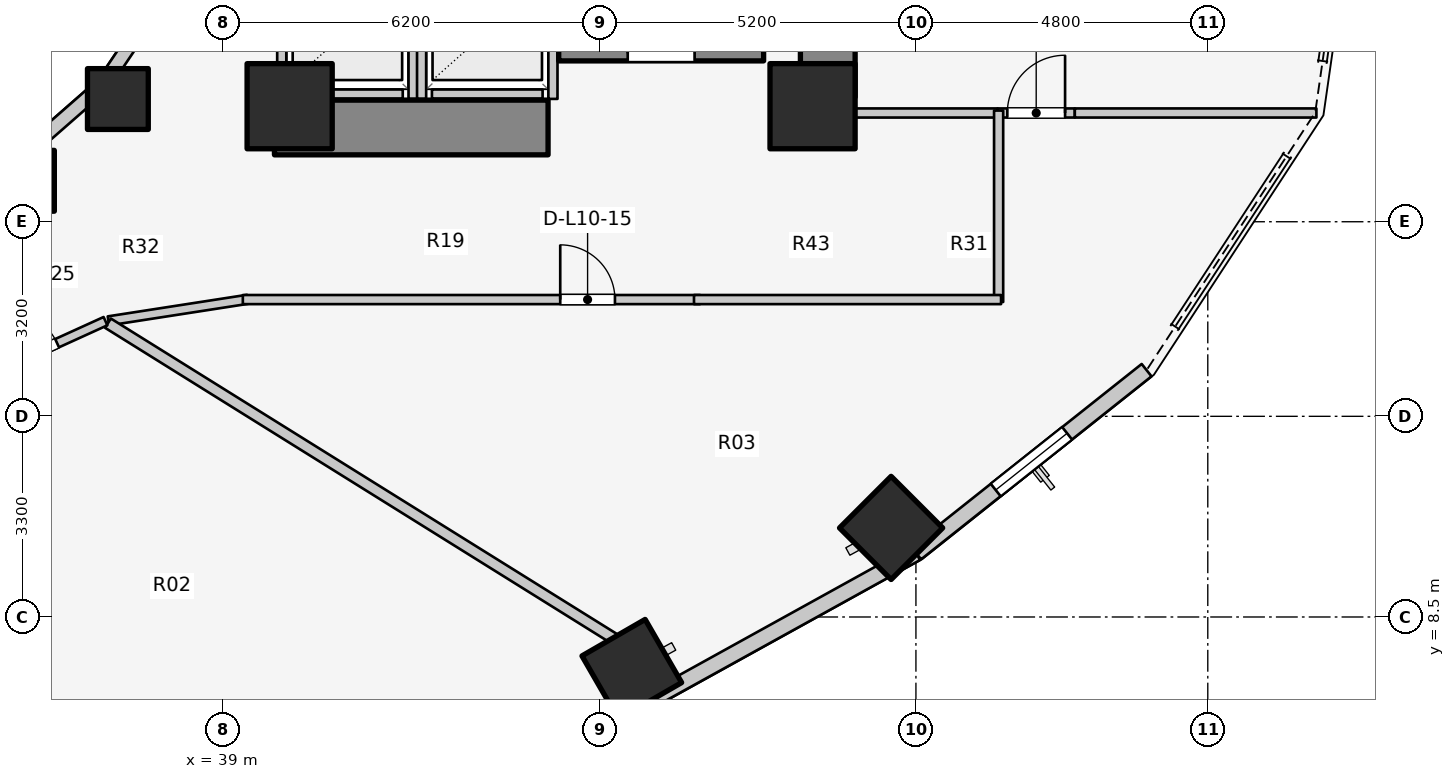
"""IFC4 building model, lengths in metres.
Left out: names, types, materials, properties, quantities, classifications, styles, units other than length and angle.
Written with IfcOpenShell. Run it as: python <this file> out.ifc"""

import sys

from ifc_helpers import new_model, si_unit, direction, frame, frame_2d, origin, origin_2d, place, context, subcontext, project, spatial, rectangle, extrude, element, fill, save


model = new_model("IFC4")
c1 = context("Model", 3, precision=1e-05, world=origin(), true_north=direction((0.0, 1.0)))
c2 = subcontext(c1, "Body", "Model", "MODEL_VIEW")
j1 = project(units=[si_unit("LENGTHUNIT", "METRE"), si_unit("PLANEANGLEUNIT", "RADIAN")], contexts=[c1])
p1 = place(None, origin())
s1 = spatial("IfcSite", under=j1, at=p1, CompositionType="ELEMENT")
p2 = place(p1, origin())
s2 = spatial("IfcBuilding", under=s1, at=p2, CompositionType="ELEMENT")
p3 = place(p2, frame((0.0, 0.0, 36.9)))
s3 = spatial("IfcBuildingStorey", under=s2, at=p3, CompositionType="ELEMENT", Elevation=36.9)
p4 = place(p3, frame((48.95, 17.05, 0.0), z_axis=(0.0, 0.0, 1.0), x_axis=(0.0, 1.0, 0.0)))
e1 = element("IfcWall", 1, at=p4, inside=s3, PredefinedType="SHEAR", context=c2, shape_type="SweptSolid", body=[
    extrude(rectangle(XDim=12.8, YDim=0.9, at=frame_2d((6.4, 0.0))), origin(), (0.0, 0.0, 1.0), 3.1),
])
p5 = place(p3, frame((39.85, 16.55, 0.0), z_axis=(0.0, 0.0, 1.0), x_axis=(1.0, 0.0, 0.0)))
e2 = element("IfcWall", 2, at=p5, inside=s3, PredefinedType="SHEAR", context=c2, shape_type="SweptSolid", body=[
    extrude(rectangle(XDim=4.5, YDim=0.9, at=frame_2d((2.25, 0.0))), origin(), (0.0, 0.0, 1.0), 3.1),
])
p6 = place(p3, frame((44.525, 17.77, 0.0), z_axis=(0.0, 0.0, 1.0), x_axis=(1.0, 0.0, 0.0)))
e3 = element("IfcWall", 3, at=p6, inside=s3, PredefinedType="SOLIDWALL", context=c2, shape_type="SweptSolid", body=[
    extrude(rectangle(XDim=3.37, YDim=0.25, at=frame_2d((1.685, 0.0))), origin(), (0.0, 0.0, 1.0), 3.1),
])
p7 = place(p6, frame((1.135, 0.0, 0.0)))
e4 = element("IfcOpeningElement", 4, at=p7, cuts=e3, PredefinedType="OPENING", context=c2, shape_type="SweptSolid", body=[
    extrude(rectangle(XDim=1.1, YDim=2.1, at=frame_2d((0.55, 1.05))), frame((0.0, 0.135, 0.0), z_axis=(0.0, -1.0, 0.0), x_axis=(1.0, 0.0, 0.0)), (0.0, 0.0, 1.0), 0.27),
])
for number, where, z_axis, x_axis in (
    (5, (40.1, 16.9, 0.0), (0.0, 0.0, 1.0), (1.0, 0.0, 0.0)),
    (6, (48.7, 16.9, 0.0), (0.0, 0.0, 1.0), (1.0, 0.0, 0.0)),
):
    element("IfcColumn", number, at=place(p3, frame(where, z_axis=z_axis, x_axis=x_axis)), inside=s3, PredefinedType="COLUMN", context=c2, shape_type="SweptSolid", body=[
        extrude(rectangle(XDim=1.4, YDim=1.4, at=origin_2d()), origin(), (0.0, 0.0, 1.0), 3.1),
    ])
p8 = place(p3, frame((35.73, 15.673, 0.0), z_axis=(0.0, 0.0, 1.0), x_axis=(1.0, 0.0, 0.0)))
e7 = element("IfcColumn", 7, at=p8, inside=s3, PredefinedType="COLUMN", context=c2, shape_type="SweptSolid", body=[
    extrude(rectangle(XDim=1.0, YDim=1.0, at=origin_2d()), origin(), (0.0, 0.0, 1.0), 3.1),
])
p9 = place(p3, frame((45.727, 7.641, 0.0), z_axis=(0.0, 0.0, 1.0), x_axis=(0.5, -0.866025403784, 0.0)))
e8 = element("IfcColumn", 8, at=p9, inside=s3, PredefinedType="COLUMN", context=c2, shape_type="SweptSolid", body=[
    extrude(rectangle(XDim=1.2, YDim=1.2, at=origin_2d()), origin(), (0.0, 0.0, 1.0), 3.1),
])
p10 = place(p3, frame((37.275, 17.018, 0.0), z_axis=(0.0, 0.0, 1.0), x_axis=(1.0, 0.0, 0.0)))
e9 = element("IfcColumn", 9, at=p10, inside=s3, PredefinedType="COLUMN", context=c2, shape_type="SweptSolid", body=[
    extrude(rectangle(XDim=1.0, YDim=1.0, at=origin_2d()), origin(), (0.0, 0.0, 1.0), 3.1),
])
p11 = place(p3, frame((49.992, 9.965, 0.0), z_axis=(0.0, 0.0, 1.0), x_axis=(0.707106781187, -0.707106781187, 0.0)))
e10 = element("IfcColumn", 10, at=p11, inside=s3, PredefinedType="COLUMN", context=c2, shape_type="SweptSolid", body=[
    extrude(rectangle(XDim=1.2, YDim=1.2, at=origin_2d()), origin(), (0.0, 0.0, 1.0), 3.1),
])
p12 = place(p3, frame((35.56, 15.968, 0.0), z_axis=(0.0, 0.0, 1.0), x_axis=(0.752576694707, 0.658504607869, 0.0)))
e11 = element("IfcWall", 11, at=p12, inside=s3, PredefinedType="STANDARD", context=c2, shape_type="SweptSolid", body=[
    extrude(rectangle(XDim=1.959, YDim=0.23, at=frame_2d((0.98, 0.0))), origin(), (0.0, 0.0, 1.0), 2.16),
])
p13 = place(p3, frame((37.035, 17.258, 0.0), z_axis=(0.0, 0.0, 1.0), x_axis=(0.558197800898, 0.829707909492, 0.0)))
e12 = element("IfcWall", 12, at=p13, inside=s3, PredefinedType="STANDARD", context=c2, shape_type="SweptSolid", body=[
    extrude(rectangle(XDim=2.027, YDim=0.23, at=frame_2d((1.013, 0.0))), origin(), (0.0, 0.0, 1.0), 2.16),
])
p14 = place(p3, frame((40.332, 5.447, 0.0), z_axis=(0.0, 0.0, 1.0), x_axis=(0.958843593522, 0.283934786811, 0.0)))
e13 = element("IfcWall", 13, at=p14, inside=s3, PredefinedType="STANDARD", context=c2, shape_type="SweptSolid", body=[
    extrude(rectangle(XDim=5.955, YDim=0.26, at=frame_2d((2.978, 0.0))), origin(), (0.0, 0.0, 1.0), 2.85),
])
p15 = place(p14, frame((2.228, 0.0, 0.75)))
e14 = element("IfcOpeningElement", 14, at=p15, cuts=e13, PredefinedType="OPENING", context=c2, shape_type="SweptSolid", body=[
    extrude(rectangle(XDim=1.5, YDim=1.6, at=frame_2d((0.75, 0.8))), frame((0.0, 0.14, 0.0), z_axis=(0.0, -1.0, 0.0), x_axis=(1.0, 0.0, 0.0)), (0.0, 0.0, 1.0), 0.28),
])
p16 = place(p3, frame((46.042, 7.138, 0.0), z_axis=(0.0, 0.0, 1.0), x_axis=(0.875137303239, 0.483874674352, 0.0)))
e15 = element("IfcWall", 15, at=p16, inside=s3, PredefinedType="STANDARD", context=c2, shape_type="SweptSolid", body=[
    extrude(rectangle(XDim=4.985, YDim=0.26, at=frame_2d((2.493, 0.0))), origin(), (0.0, 0.0, 1.0), 2.85),
])
p17 = place(p3, frame((50.405, 9.55, 0.0), z_axis=(0.0, 0.0, 1.0), x_axis=(0.783123133379, 0.621866672179, 0.0)))
e16 = element("IfcWall", 16, at=p17, inside=s3, PredefinedType="STANDARD", context=c2, shape_type="SweptSolid", body=[
    extrude(rectangle(XDim=4.839, YDim=0.26, at=frame_2d((2.419, 0.0))), origin(), (0.0, 0.0, 1.0), 2.85),
])
p18 = place(p17, frame((1.669, 0.0, 0.75)))
e17 = element("IfcOpeningElement", 17, at=p18, cuts=e16, PredefinedType="OPENING", context=c2, shape_type="SweptSolid", body=[
    extrude(rectangle(XDim=1.5, YDim=1.6, at=frame_2d((0.75, 0.8))), frame((0.0, 0.14, 0.0), z_axis=(0.0, -1.0, 0.0), x_axis=(1.0, 0.0, 0.0)), (0.0, 0.0, 1.0), 0.28),
])
p19 = place(p3, frame((40.14, 17.1, 0.0), z_axis=(0.0, 0.0, 1.0), x_axis=(1.0, 0.0, 0.0)))
e18 = element("IfcWall", 18, at=p19, inside=s3, PredefinedType="SOLIDWALL", context=c2, shape_type="SweptSolid", body=[
    extrude(rectangle(XDim=1.82, YDim=0.15, at=frame_2d((0.91, 0.0))), origin(), (0.0, 0.0, 1.0), 2.12),
])
p20 = place(p3, frame((39.97, 17.02, 0.0), z_axis=(0.0, 0.0, 1.0), x_axis=(0.0, 1.0, 0.0)))
e19 = element("IfcWall", 19, at=p20, inside=s3, PredefinedType="SOLIDWALL", context=c2, shape_type="SweptSolid", body=[
    extrude(rectangle(XDim=2.22, YDim=0.15, at=frame_2d((1.11, 0.0))), origin(), (0.0, 0.0, 1.0), 2.12),
])
p21 = place(p3, frame((42.13, 17.02, 0.0), z_axis=(0.0, 0.0, 1.0), x_axis=(0.0, 1.0, 0.0)))
e20 = element("IfcWall", 20, at=p21, inside=s3, PredefinedType="SOLIDWALL", context=c2, shape_type="SweptSolid", body=[
    extrude(rectangle(XDim=2.22, YDim=0.15, at=frame_2d((1.11, 0.0))), origin(), (0.0, 0.0, 1.0), 2.855),
])
p22 = place(p3, frame((42.44, 17.1, 0.0), z_axis=(0.0, 0.0, 1.0), x_axis=(1.0, 0.0, 0.0)))
e21 = element("IfcWall", 21, at=p22, inside=s3, PredefinedType="SOLIDWALL", context=c2, shape_type="SweptSolid", body=[
    extrude(rectangle(XDim=1.82, YDim=0.15, at=frame_2d((0.91, 0.0))), origin(), (0.0, 0.0, 1.0), 2.855),
])
p23 = place(p3, frame((42.27, 17.02, 0.0), z_axis=(0.0, 0.0, 1.0), x_axis=(0.0, 1.0, 0.0)))
e22 = element("IfcWall", 22, at=p23, inside=s3, PredefinedType="SOLIDWALL", context=c2, shape_type="SweptSolid", body=[
    extrude(rectangle(XDim=2.22, YDim=0.15, at=frame_2d((1.11, 0.0))), origin(), (0.0, 0.0, 1.0), 2.855),
])
p24 = place(p3, frame((44.43, 17.02, 0.0), z_axis=(0.0, 0.0, 1.0), x_axis=(0.0, 1.0, 0.0)))
e23 = element("IfcWall", 23, at=p24, inside=s3, PredefinedType="SOLIDWALL", context=c2, shape_type="SweptSolid", body=[
    extrude(rectangle(XDim=2.22, YDim=0.15, at=frame_2d((1.11, 0.0))), origin(), (0.0, 0.0, 1.0), 2.12),
])
p25 = place(p3, frame((48.95, 16.788, 0.0), z_axis=(0.0, 0.0, 1.0), x_axis=(1.0, 0.0, 0.0)))
e24 = element("IfcWall", 24, at=p25, inside=s3, PredefinedType="PARTITIONING", context=c2, shape_type="SweptSolid", body=[
    extrude(rectangle(XDim=2.793, YDim=0.15, at=frame_2d((1.396, 0.0))), origin(), (0.0, 0.0, 1.0), 2.069),
])
p26 = place(p3, frame((51.743, 16.788, 0.0), z_axis=(0.0, 0.0, 1.0), x_axis=(1.0, 0.0, 0.0)))
e25 = element("IfcWall", 25, at=p26, inside=s3, PredefinedType="PARTITIONING", context=c2, shape_type="SweptSolid", body=[
    extrude(rectangle(XDim=1.27, YDim=0.15, at=frame_2d((0.635, 0.0))), origin(), (0.0, 0.0, 1.0), 2.855),
])
p27 = place(p26, frame((0.16, 0.0, 0.0)))
e26 = element("IfcOpeningElement", 26, at=p27, cuts=e25, PredefinedType="OPENING", context=c2, shape_type="SweptSolid", body=[
    extrude(rectangle(XDim=0.95, YDim=2.1, at=frame_2d((0.475, 1.05))), frame((0.0, 0.085, 0.0), z_axis=(0.0, -1.0, 0.0), x_axis=(1.0, 0.0, 0.0)), (0.0, 0.0, 1.0), 0.17),
])
p28 = place(p3, frame((53.013, 16.788, 0.0), z_axis=(0.0, 0.0, 1.0), x_axis=(1.0, 0.0, 0.0)))
e27 = element("IfcWall", 27, at=p28, inside=s3, PredefinedType="PARTITIONING", context=c2, shape_type="SweptSolid", body=[
    extrude(rectangle(XDim=3.973, YDim=0.15, at=frame_2d((1.987, 0.0))), origin(), (0.0, 0.0, 1.0), 2.855),
])
p29 = place(p3, frame((51.76, 13.68, 0.0), z_axis=(0.0, 0.0, 1.0), x_axis=(0.0, 1.0, 0.0)))
e28 = element("IfcWall", 28, at=p29, inside=s3, PredefinedType="PARTITIONING", context=c2, shape_type="SweptSolid", body=[
    extrude(rectangle(XDim=3.148, YDim=0.15, at=frame_2d((1.574, 0.0))), origin(), (0.0, 0.0, 1.0), 2.855),
])
p30 = place(p3, frame((37.119, 13.369, 0.0), z_axis=(0.0, 0.0, 1.0), x_axis=(0.988184633586, 0.153268163508, 0.0)))
e29 = element("IfcWall", 29, at=p30, inside=s3, PredefinedType="PARTITIONING", context=c2, shape_type="SweptSolid", body=[
    extrude(rectangle(XDim=2.318, YDim=0.15, at=frame_2d((1.159, 0.0))), origin(), (0.0, 0.0, 1.0), 2.237),
])
p31 = place(p3, frame((39.33, 13.72, 0.0), z_axis=(0.0, 0.0, 1.0), x_axis=(1.0, 0.0, 0.0)))
e30 = element("IfcWall", 30, at=p31, inside=s3, PredefinedType="PARTITIONING", context=c2, shape_type="SweptSolid", body=[
    extrude(rectangle(XDim=7.52, YDim=0.15, at=frame_2d((3.76, 0.0))), origin(), (0.0, 0.0, 1.0), 2.237),
])
p32 = place(p31, frame((5.22, 0.0, 0.0)))
e31 = element("IfcOpeningElement", 31, at=p32, cuts=e30, PredefinedType="OPENING", context=c2, shape_type="SweptSolid", body=[
    extrude(rectangle(XDim=0.9, YDim=2.1, at=frame_2d((0.45, 1.05))), frame((0.0, 0.085, 0.0), z_axis=(0.0, -1.0, 0.0), x_axis=(1.0, 0.0, 0.0)), (0.0, 0.0, 1.0), 0.17),
])
p33 = place(p3, frame((46.75, 13.72, 0.0), z_axis=(0.0, 0.0, 1.0), x_axis=(1.0, 0.0, 0.0)))
e32 = element("IfcWall", 32, at=p33, inside=s3, PredefinedType="PARTITIONING", context=c2, shape_type="SweptSolid", body=[
    extrude(rectangle(XDim=5.05, YDim=0.15, at=frame_2d((2.525, 0.0))), origin(), (0.0, 0.0, 1.0), 2.069),
])
p34 = place(p3, frame((37.112, 13.332, 0.0), z_axis=(0.0, 0.0, 1.0), x_axis=(0.848647785721, -0.52895834977, 0.0)))
e33 = element("IfcWall", 33, at=p34, inside=s3, PredefinedType="PARTITIONING", context=c2, shape_type="SweptSolid", body=[
    extrude(rectangle(XDim=9.81, YDim=0.18, at=frame_2d((4.905, 0.0))), origin(), (0.0, 0.0, 1.0), 2.237),
])
p35 = place(p3, frame((34.615, 12.247, 0.0), z_axis=(0.0, 0.0, 1.0), x_axis=(0.910186679378, 0.414198272186, 0.0)))
e34 = element("IfcWall", 34, at=p35, inside=s3, PredefinedType="PARTITIONING", context=c2, shape_type="SweptSolid", body=[
    extrude(rectangle(XDim=2.698, YDim=0.15, at=frame_2d((1.349, 0.0))), origin(), (0.0, 0.0, 1.0), 2.237),
])
p36 = place(p35, frame((0.874, 0.0, 0.0)))
e35 = element("IfcOpeningElement", 35, at=p36, cuts=e34, PredefinedType="OPENING", context=c2, shape_type="SweptSolid", body=[
    extrude(rectangle(XDim=0.95, YDim=2.1, at=frame_2d((0.475, 1.05))), frame((0.0, 0.085, 0.0), z_axis=(0.0, -1.0, 0.0), x_axis=(1.0, 0.0, 0.0)), (0.0, 0.0, 1.0), 0.17),
])
p37 = place(p18, origin())
e36 = element("IfcWindow", 36, at=p37, inside=s3, PartitioningType="SINGLE_PANEL", PredefinedType="WINDOW", context=c2, shape_type="SweptSolid", body=[
    extrude(rectangle(XDim=1.5, YDim=1.6, at=frame_2d((0.75, 0.8))), frame((0.0, 0.03, 0.0), z_axis=(0.0, -1.0, 0.0), x_axis=(1.0, 0.0, 0.0)), (0.0, 0.0, 1.0), 0.06),
])
fill(e17, e36)
p38 = place(p7, origin())
e37 = element("IfcDoor", 37, at=p38, inside=s3, OperationType="SINGLE_SWING_LEFT", PredefinedType="DOOR", context=c2, shape_type="SweptSolid", body=[
    extrude(rectangle(XDim=1.1, YDim=2.1, at=frame_2d((0.55, 1.05))), frame((0.0, 0.025, 0.0), z_axis=(0.0, -1.0, 0.0), x_axis=(1.0, 0.0, 0.0)), (0.0, 0.0, 1.0), 0.05),
])
fill(e4, e37)
p39 = place(p27, origin())
e38 = element("IfcDoor", 38, at=p39, inside=s3, OperationType="SINGLE_SWING_RIGHT", PredefinedType="DOOR", context=c2, shape_type="SweptSolid", body=[
    extrude(rectangle(XDim=0.95, YDim=2.1, at=frame_2d((0.475, 1.05))), frame((0.0, 0.025, 0.0), z_axis=(0.0, -1.0, 0.0), x_axis=(1.0, 0.0, 0.0)), (0.0, 0.0, 1.0), 0.05),
])
fill(e26, e38)
p40 = place(p32, origin())
e39 = element("IfcDoor", 39, at=p40, inside=s3, OperationType="SINGLE_SWING_LEFT", PredefinedType="DOOR", context=c2, shape_type="SweptSolid", body=[
    extrude(rectangle(XDim=0.9, YDim=2.1, at=frame_2d((0.45, 1.05))), frame((0.0, 0.025, 0.0), z_axis=(0.0, -1.0, 0.0), x_axis=(1.0, 0.0, 0.0)), (0.0, 0.0, 1.0), 0.05),
])
fill(e31, e39)
p41 = place(p36, origin())
e40 = element("IfcDoor", 40, at=p41, inside=s3, OperationType="SINGLE_SWING_LEFT", PredefinedType="DOOR", context=c2, shape_type="SweptSolid", body=[
    extrude(rectangle(XDim=0.95, YDim=2.1, at=frame_2d((0.475, 1.05))), frame((0.0, 0.025, 0.0), z_axis=(0.0, -1.0, 0.0), x_axis=(1.0, 0.0, 0.0)), (0.0, 0.0, 1.0), 0.05),
])
fill(e35, e40)
save(model, sys.argv[1])
